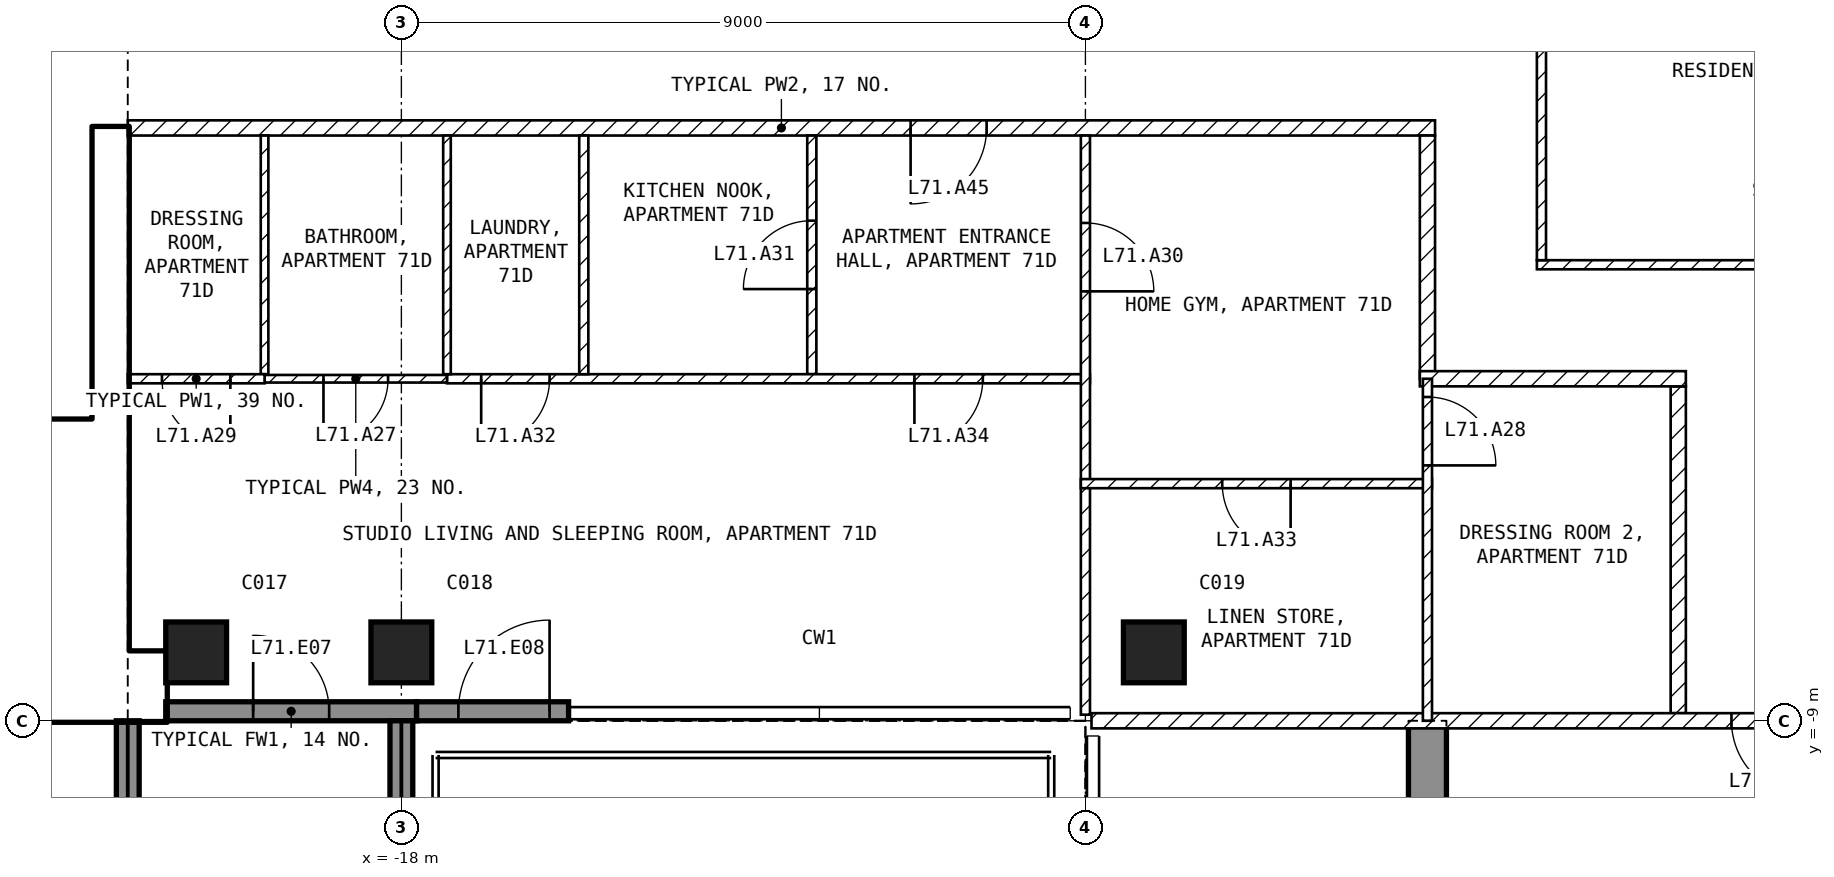
"""IFC4 building model, lengths in metres.
Left out: names, types, materials, properties, quantities, classifications, styles, units other than length and angle.
Written with IfcOpenShell. Run it as: python <this file> out.ifc"""

import sys

from ifc_helpers import new_model, si_unit, direction, frame, frame_2d, origin, origin_2d, place, context, subcontext, project, spatial, polyline, rectangle, outline, extrude, element, fill, save


model = new_model("IFC4")
c1 = context("Model", 3, precision=1e-05, world=origin(), true_north=direction((0.0, 1.0)))
c2 = subcontext(c1, "Body", "Model", "MODEL_VIEW")
j1 = project(units=[si_unit("LENGTHUNIT", "METRE"), si_unit("PLANEANGLEUNIT", "RADIAN")], contexts=[c1])
p1 = place(None, origin())
s1 = spatial("IfcSite", under=j1, at=p1, CompositionType="ELEMENT")
p2 = place(p1, origin())
s2 = spatial("IfcBuilding", under=s1, at=p2, CompositionType="ELEMENT")
p3 = place(p2, frame((0.0, 0.0, 278.0)))
s3 = spatial("IfcBuildingStorey", under=s2, at=p3, CompositionType="ELEMENT", Elevation=278.0)
for number, where, z_axis, x_axis in (
    (1, (-20.7, -8.1, -0.25), (0.0, 0.0, 1.0), (1.0, 0.0, 0.0)),
    (2, (-18.0, -8.1, -0.25), (0.0, 0.0, 1.0), (1.0, 0.0, 0.0)),
    (3, (-8.1, -8.1, -0.25), (0.0, 0.0, 1.0), (1.0, 0.0, 0.0)),
):
    element("IfcColumn", number, at=place(p3, frame(where, z_axis=z_axis, x_axis=x_axis)), inside=s3, PredefinedType="COLUMN", context=c2, shape_type="SweptSolid", body=[
        extrude(rectangle(XDim=0.8, YDim=0.8, at=origin_2d()), origin(), (0.0, 0.0, 1.0), 3.5),
    ])
p4 = place(p3, frame((-4.75, -16.7, -0.25), z_axis=(1.0, 0.0, 0.0), x_axis=(0.0, 1.0, 0.0)))
e4 = element("IfcWall", 4, at=p4, inside=s3, PredefinedType="SHEAR", context=c2, shape_type="SweptSolid", body=[
    extrude(outline(polyline([(0.0, 0.0), (3.2, 0.0), (3.2, 2.65), (5.6, 2.65), (5.6, 0.0), (7.7, 0.0), (7.7, 3.5), (0.0, 3.5), (0.0, 0.0)])), origin(), (0.0, 0.0, 1.0), 0.5),
])
p5 = place(p3, frame((-21.1, -8.875, 0.0), z_axis=(0.0, 0.0, 1.0), x_axis=(1.0, 0.0, 0.0)))
e5 = element("IfcWall", 5, at=p5, inside=s3, PredefinedType="SOLIDWALL", context=c2, shape_type="SweptSolid", body=[
    extrude(rectangle(XDim=3.3, YDim=0.25, at=frame_2d((1.65, 0.0))), origin(), (0.0, 0.0, 1.0), 3.25),
])
p6 = place(p5, frame((1.15, 0.0, 0.0)))
e6 = element("IfcOpeningElement", 6, at=p6, cuts=e5, PredefinedType="OPENING", context=c2, shape_type="SweptSolid", body=[
    extrude(rectangle(XDim=1.0, YDim=2.4, at=frame_2d((0.5, 1.2))), frame((0.0, 0.135, 0.0), z_axis=(0.0, -1.0, 0.0), x_axis=(1.0, 0.0, 0.0)), (0.0, 0.0, 1.0), 0.27),
])
p7 = place(p3, frame((-17.8, -8.875, 0.0), z_axis=(0.0, 0.0, 1.0), x_axis=(1.0, 0.0, 0.0)))
e7 = element("IfcWall", 7, at=p7, inside=s3, PredefinedType="SOLIDWALL", context=c2, shape_type="SweptSolid", body=[
    extrude(rectangle(XDim=2.0, YDim=0.25, at=frame_2d((1.0, 0.0))), origin(), (0.0, 0.0, 1.0), 3.25),
])
p8 = place(p7, frame((0.55, 0.0, 0.0)))
e8 = element("IfcOpeningElement", 8, at=p8, cuts=e7, PredefinedType="OPENING", context=c2, shape_type="SweptSolid", body=[
    extrude(rectangle(XDim=1.2, YDim=2.4, at=frame_2d((0.6, 1.2))), frame((0.0, 0.135, 0.0), z_axis=(0.0, -1.0, 0.0), x_axis=(1.0, 0.0, 0.0)), (0.0, 0.0, 1.0), 0.27),
])
p9 = place(p3, frame((-21.6, -9.0, 0.0), z_axis=(0.0, 0.0, 1.0), x_axis=(0.0, -1.0, 0.0)))
e9 = element("IfcWall", 9, at=p9, inside=s3, PredefinedType="SOLIDWALL", context=c2, shape_type="SweptSolid", body=[
    extrude(rectangle(XDim=2.7, YDim=0.3, at=frame_2d((1.35, 0.0))), origin(), (0.0, 0.0, 1.0), 3.25),
])
p10 = place(p3, frame((-18.0, -9.0, 0.0), z_axis=(0.0, 0.0, 1.0), x_axis=(0.0, -1.0, 0.0)))
e10 = element("IfcWall", 10, at=p10, inside=s3, PredefinedType="SOLIDWALL", context=c2, shape_type="SweptSolid", body=[
    extrude(rectangle(XDim=2.74, YDim=0.3, at=frame_2d((1.37, 0.0))), origin(), (0.0, 0.0, 1.0), 3.25),
])
p11 = place(p3, frame((-30.2, -8.55, 0.0), z_axis=(0.0, 0.0, 1.0), x_axis=(1.0, 0.0, 0.0)))
e11 = element("IfcWall", 11, at=p11, inside=s3, PredefinedType="SHEAR", context=c2, shape_type="SweptSolid", body=[
    extrude(rectangle(XDim=9.1, YDim=0.9, at=frame_2d((4.55, 0.0))), origin(), (0.0, 0.0, 1.0), 3.25),
])
p12 = place(p3, frame((-21.825, -8.1, 0.0), z_axis=(0.0, 0.0, 1.0), x_axis=(0.0, 1.0, 0.0)))
e12 = element("IfcWall", 12, at=p12, inside=s3, PredefinedType="SHEAR", context=c2, shape_type="SweptSolid", body=[
    extrude(rectangle(XDim=6.9, YDim=0.45, at=frame_2d((3.45, 0.0))), origin(), (0.0, 0.0, 1.0), 3.25),
])
p13 = place(p3, frame((-28.35, -5.15, 0.0), z_axis=(0.0, 0.0, 1.0), x_axis=(1.0, 0.0, 0.0)))
e13 = element("IfcWall", 13, at=p13, inside=s3, PredefinedType="SOLIDWALL", context=c2, shape_type="SweptSolid", body=[
    extrude(rectangle(XDim=6.3, YDim=0.2, at=frame_2d((3.15, 0.0))), origin(), (0.0, 0.0, 1.0), 3.25),
])
p14 = place(p13, frame((5.1, 0.0, 0.0)))
e14 = element("IfcOpeningElement", 14, at=p14, cuts=e13, PredefinedType="OPENING", context=c2, shape_type="SweptSolid", body=[
    extrude(rectangle(XDim=1.0, YDim=2.1, at=frame_2d((0.5, 1.05))), frame((0.0, 0.11, 0.0), z_axis=(0.0, -1.0, 0.0), x_axis=(1.0, 0.0, 0.0)), (0.0, 0.0, 1.0), 0.22),
])
p15 = place(p3, frame((-3.06, -3.0, 0.0), z_axis=(0.0, 0.0, 1.0), x_axis=(1.0, 0.0, 0.0)))
e15 = element("IfcWall", 15, at=p15, inside=s3, PredefinedType="PARTITIONING", context=c2, shape_type="SweptSolid", body=[
    extrude(rectangle(XDim=6.12, YDim=0.12, at=frame_2d((3.06, 0.0))), origin(), (0.0, 0.0, 1.0), 3.25),
])
p16 = place(p3, frame((-3.0, 2.94, 0.0), z_axis=(0.0, 0.0, 1.0), x_axis=(0.0, -1.0, 0.0)))
e16 = element("IfcWall", 16, at=p16, inside=s3, PredefinedType="PARTITIONING", context=c2, shape_type="SweptSolid", body=[
    extrude(rectangle(XDim=5.88, YDim=0.12, at=frame_2d((2.94, 0.0))), origin(), (0.0, 0.0, 1.0), 3.25),
])
p17 = place(p3, frame((-4.4, -1.2, 0.0), z_axis=(0.0, 0.0, 1.0), x_axis=(-1.0, 0.0, 0.0)))
e17 = element("IfcWall", 17, at=p17, inside=s3, PredefinedType="PARTITIONING", context=c2, shape_type="SweptSolid", body=[
    extrude(rectangle(XDim=17.2, YDim=0.2, at=frame_2d((8.6, 0.0))), origin(), (0.0, 0.0, 1.0), 3.25),
])
p18 = place(p17, frame((5.9, 0.0, 0.0)))
e18 = element("IfcOpeningElement", 18, at=p18, cuts=e17, PredefinedType="OPENING", context=c2, shape_type="SweptSolid", body=[
    extrude(rectangle(XDim=1.0, YDim=2.1, at=frame_2d((0.5, 1.05))), frame((0.0, 0.11, 0.0), z_axis=(0.0, -1.0, 0.0), x_axis=(1.0, 0.0, 0.0)), (0.0, 0.0, 1.0), 0.22),
])
p19 = place(p3, frame((-4.5, -4.5, 0.0), z_axis=(0.0, 0.0, 1.0), x_axis=(0.0, 1.0, 0.0)))
e19 = element("IfcWall", 19, at=p19, inside=s3, PredefinedType="PARTITIONING", context=c2, shape_type="SweptSolid", body=[
    extrude(rectangle(XDim=3.2, YDim=0.2, at=frame_2d((1.6, 0.0))), origin(), (0.0, 0.0, 1.0), 3.25),
])
p20 = place(p3, frame((-1.2, -8.9, 0.0), z_axis=(0.0, 0.0, 1.0), x_axis=(0.0, 1.0, 0.0)))
e20 = element("IfcWall", 20, at=p20, inside=s3, PredefinedType="PARTITIONING", context=c2, shape_type="SweptSolid", body=[
    extrude(rectangle(XDim=4.3, YDim=0.2, at=frame_2d((2.15, 0.0))), origin(), (0.0, 0.0, 1.0), 3.25),
])
p21 = place(p3, frame((-1.1, -4.5, 0.0), z_axis=(0.0, 0.0, 1.0), x_axis=(-1.0, 0.0, 0.0)))
e21 = element("IfcWall", 21, at=p21, inside=s3, PredefinedType="PARTITIONING", context=c2, shape_type="SweptSolid", body=[
    extrude(rectangle(XDim=3.5, YDim=0.2, at=frame_2d((1.75, 0.0))), origin(), (0.0, 0.0, 1.0), 3.25),
])
p22 = place(p3, frame((8.92, -9.0, 0.0), z_axis=(0.0, 0.0, 1.0), x_axis=(-1.0, 0.0, 0.0)))
e22 = element("IfcWall", 22, at=p22, inside=s3, PredefinedType="PARTITIONING", context=c2, shape_type="SweptSolid", body=[
    extrude(rectangle(XDim=17.84, YDim=0.2, at=frame_2d((8.92, 0.0))), origin(), (0.0, 0.0, 1.0), 3.25),
])
p23 = place(p22, frame((8.42, 0.0, 0.0)))
e23 = element("IfcOpeningElement", 23, at=p23, cuts=e22, PredefinedType="OPENING", context=c2, shape_type="SweptSolid", body=[
    extrude(rectangle(XDim=1.0, YDim=2.1, at=frame_2d((0.5, 1.05))), frame((0.0, 0.11, 0.0), z_axis=(0.0, -1.0, 0.0), x_axis=(1.0, 0.0, 0.0)), (0.0, 0.0, 1.0), 0.22),
])
p24 = place(p3, frame((-12.6, -4.44, 0.0), z_axis=(0.0, 0.0, 1.0), x_axis=(0.0, 1.0, 0.0)))
e24 = element("IfcWall", 24, at=p24, inside=s3, PredefinedType="PARTITIONING", context=c2, shape_type="SweptSolid", body=[
    extrude(rectangle(XDim=3.14, YDim=0.12, at=frame_2d((1.57, 0.0))), origin(), (0.0, 0.0, 1.0), 3.25),
])
p25 = place(p24, frame((1.12, 0.0, 0.0)))
e25 = element("IfcOpeningElement", 25, at=p25, cuts=e24, PredefinedType="OPENING", context=c2, shape_type="SweptSolid", body=[
    extrude(rectangle(XDim=0.9, YDim=2.1, at=frame_2d((0.45, 1.05))), frame((0.0, 0.07, 0.0), z_axis=(0.0, -1.0, 0.0), x_axis=(1.0, 0.0, 0.0)), (0.0, 0.0, 1.0), 0.14),
])
p26 = place(p3, frame((-8.94, -4.5, 0.0), z_axis=(0.0, 0.0, 1.0), x_axis=(-1.0, 0.0, 0.0)))
e26 = element("IfcWall", 26, at=p26, inside=s3, PredefinedType="PARTITIONING", context=c2, shape_type="SweptSolid", body=[
    extrude(rectangle(XDim=8.46, YDim=0.12, at=frame_2d((4.23, 0.0))), origin(), (0.0, 0.0, 1.0), 3.25),
])
p27 = place(p26, frame((7.11, 0.0, 0.0)))
e27 = element("IfcOpeningElement", 27, at=p27, cuts=e26, PredefinedType="OPENING", context=c2, shape_type="SweptSolid", body=[
    extrude(rectangle(XDim=0.9, YDim=2.1, at=frame_2d((0.45, 1.05))), frame((0.0, 0.07, 0.0), z_axis=(0.0, -1.0, 0.0), x_axis=(1.0, 0.0, 0.0)), (0.0, 0.0, 1.0), 0.14),
])
p28 = place(p26, frame((1.41, 0.0, 0.0)))
e28 = element("IfcOpeningElement", 28, at=p28, cuts=e26, PredefinedType="OPENING", context=c2, shape_type="SweptSolid", body=[
    extrude(rectangle(XDim=0.9, YDim=2.1, at=frame_2d((0.45, 1.05))), frame((0.0, 0.07, 0.0), z_axis=(0.0, -1.0, 0.0), x_axis=(1.0, 0.0, 0.0)), (0.0, 0.0, 1.0), 0.14),
])
p29 = place(p3, frame((-9.0, -1.3, 0.0), z_axis=(0.0, 0.0, 1.0), x_axis=(0.0, -1.0, 0.0)))
e29 = element("IfcWall", 29, at=p29, inside=s3, PredefinedType="PARTITIONING", context=c2, shape_type="SweptSolid", body=[
    extrude(rectangle(XDim=7.62, YDim=0.12, at=frame_2d((3.81, 0.0))), origin(), (0.0, 0.0, 1.0), 3.25),
])
p30 = place(p29, frame((1.15, 0.0, 0.0)))
e30 = element("IfcOpeningElement", 30, at=p30, cuts=e29, PredefinedType="OPENING", context=c2, shape_type="SweptSolid", body=[
    extrude(rectangle(XDim=0.9, YDim=2.1, at=frame_2d((0.45, 1.05))), frame((0.0, 0.07, 0.0), z_axis=(0.0, -1.0, 0.0), x_axis=(1.0, 0.0, 0.0)), (0.0, 0.0, 1.0), 0.14),
])
p31 = place(p3, frame((-15.6, -4.44, 0.0), z_axis=(0.0, 0.0, 1.0), x_axis=(0.0, 1.0, 0.0)))
e31 = element("IfcWall", 31, at=p31, inside=s3, PredefinedType="PARTITIONING", context=c2, shape_type="SweptSolid", body=[
    extrude(rectangle(XDim=3.14, YDim=0.12, at=frame_2d((1.57, 0.0))), origin(), (0.0, 0.0, 1.0), 3.25),
])
for number, where, z_axis, x_axis in (
    (32, (-17.4, -4.44, 0.0), (0.0, 0.0, 1.0), (0.0, 1.0, 0.0)),
    (33, (-19.8, -4.44, 0.0), (0.0, 0.0, 1.0), (0.0, 1.0, 0.0)),
):
    element("IfcWall", number, at=place(p3, frame(where, z_axis=z_axis, x_axis=x_axis)), inside=s3, PredefinedType="PARTITIONING", context=c2, shape_type="SweptSolid", body=[
        extrude(rectangle(XDim=3.14, YDim=0.1, at=frame_2d((1.57, 0.0))), origin(), (0.0, 0.0, 1.0), 3.25),
    ])
p32 = place(p3, frame((-17.4, -4.5, 0.0), z_axis=(0.0, 0.0, 1.0), x_axis=(-1.0, 0.0, 0.0)))
e34 = element("IfcWall", 34, at=p32, inside=s3, PredefinedType="PARTITIONING", context=c2, shape_type="SweptSolid", body=[
    extrude(rectangle(XDim=2.4, YDim=0.1, at=frame_2d((1.2, 0.0))), origin(), (0.0, 0.0, 1.0), 3.25),
])
p33 = place(p32, frame((0.775, 0.0, 0.0)))
e35 = element("IfcOpeningElement", 35, at=p33, cuts=e34, PredefinedType="OPENING", context=c2, shape_type="SweptSolid", body=[
    extrude(rectangle(XDim=0.85, YDim=2.1, at=frame_2d((0.425, 1.05))), frame((0.0, 0.06, 0.0), z_axis=(0.0, -1.0, 0.0), x_axis=(1.0, 0.0, 0.0)), (0.0, 0.0, 1.0), 0.12),
])
p34 = place(p3, frame((-19.8, -4.5, 0.0), z_axis=(0.0, 0.0, 1.0), x_axis=(-1.0, 0.0, 0.0)))
e36 = element("IfcWall", 36, at=p34, inside=s3, PredefinedType="PARTITIONING", context=c2, shape_type="SweptSolid", body=[
    extrude(rectangle(XDim=1.8, YDim=0.12, at=frame_2d((0.9, 0.0))), origin(), (0.0, 0.0, 1.0), 3.25),
])
p35 = place(p34, frame((0.45, 0.0, 0.0)))
e37 = element("IfcOpeningElement", 37, at=p35, cuts=e36, PredefinedType="OPENING", context=c2, shape_type="SweptSolid", body=[
    extrude(rectangle(XDim=0.9, YDim=2.1, at=frame_2d((0.45, 1.05))), frame((0.0, 0.07, 0.0), z_axis=(0.0, -1.0, 0.0), x_axis=(1.0, 0.0, 0.0)), (0.0, 0.0, 1.0), 0.14),
])
p36 = place(p3, frame((-4.44, -5.88, 0.0), z_axis=(0.0, 0.0, 1.0), x_axis=(-1.0, 0.0, 0.0)))
e38 = element("IfcWall", 38, at=p36, inside=s3, PredefinedType="PARTITIONING", context=c2, shape_type="SweptSolid", body=[
    extrude(rectangle(XDim=4.62, YDim=0.12, at=frame_2d((2.31, 0.0))), origin(), (0.0, 0.0, 1.0), 3.25),
])
p37 = place(p36, frame((1.86, 0.0, 0.0)))
e39 = element("IfcOpeningElement", 39, at=p37, cuts=e38, PredefinedType="OPENING", context=c2, shape_type="SweptSolid", body=[
    extrude(rectangle(XDim=0.9, YDim=2.1, at=frame_2d((0.45, 1.05))), frame((0.0, 0.07, 0.0), z_axis=(0.0, -1.0, 0.0), x_axis=(1.0, 0.0, 0.0)), (0.0, 0.0, 1.0), 0.14),
])
p38 = place(p3, frame((-4.5, -4.5, 0.0), z_axis=(0.0, 0.0, 1.0), x_axis=(0.0, -1.0, 0.0)))
e40 = element("IfcWall", 40, at=p38, inside=s3, PredefinedType="PARTITIONING", context=c2, shape_type="SweptSolid", body=[
    extrude(rectangle(XDim=4.5, YDim=0.12, at=frame_2d((2.25, 0.0))), origin(), (0.0, 0.0, 1.0), 3.25),
])
p39 = place(p38, frame((0.24, 0.0, 0.0)))
e41 = element("IfcOpeningElement", 41, at=p39, cuts=e40, PredefinedType="OPENING", context=c2, shape_type="SweptSolid", body=[
    extrude(rectangle(XDim=0.9, YDim=2.1, at=frame_2d((0.45, 1.05))), frame((0.0, 0.07, 0.0), z_axis=(0.0, -1.0, 0.0), x_axis=(1.0, 0.0, 0.0)), (0.0, 0.0, 1.0), 0.14),
])
p40 = place(p6, origin())
e42 = element("IfcDoor", 42, at=p40, inside=s3, OperationType="SINGLE_SWING_LEFT", PredefinedType="DOOR", context=c2, shape_type="SweptSolid", body=[
    extrude(rectangle(XDim=1.0, YDim=2.4, at=frame_2d((0.5, 1.2))), frame((0.0, 0.025, 0.0), z_axis=(0.0, -1.0, 0.0), x_axis=(1.0, 0.0, 0.0)), (0.0, 0.0, 1.0), 0.05),
])
fill(e6, e42)
p41 = place(p8, origin())
e43 = element("IfcDoor", 43, at=p41, inside=s3, OperationType="SINGLE_SWING_RIGHT", PredefinedType="DOOR", context=c2, shape_type="SweptSolid", body=[
    extrude(rectangle(XDim=1.2, YDim=2.4, at=frame_2d((0.6, 1.2))), frame((0.0, 0.025, 0.0), z_axis=(0.0, -1.0, 0.0), x_axis=(1.0, 0.0, 0.0)), (0.0, 0.0, 1.0), 0.05),
])
fill(e8, e43)
p42 = place(p14, origin())
e44 = element("IfcDoor", 44, at=p42, inside=s3, OperationType="SINGLE_SWING_LEFT", PredefinedType="DOOR", context=c2, shape_type="SweptSolid", body=[
    extrude(rectangle(XDim=1.0, YDim=2.1, at=frame_2d((0.5, 1.05))), frame((0.0, 0.025, 0.0), z_axis=(0.0, -1.0, 0.0), x_axis=(1.0, 0.0, 0.0)), (0.0, 0.0, 1.0), 0.05),
])
fill(e14, e44)
p43 = place(p33, origin())
e45 = element("IfcDoor", 45, at=p43, inside=s3, OperationType="SINGLE_SWING_RIGHT", PredefinedType="DOOR", context=c2, shape_type="SweptSolid", body=[
    extrude(rectangle(XDim=0.85, YDim=2.1, at=frame_2d((0.425, 1.05))), frame((0.0, 0.025, 0.0), z_axis=(0.0, -1.0, 0.0), x_axis=(1.0, 0.0, 0.0)), (0.0, 0.0, 1.0), 0.05),
])
fill(e35, e45)
p44 = place(p39, origin())
e46 = element("IfcDoor", 46, at=p44, inside=s3, OperationType="SINGLE_SWING_RIGHT", PredefinedType="DOOR", context=c2, shape_type="SweptSolid", body=[
    extrude(rectangle(XDim=0.9, YDim=2.1, at=frame_2d((0.45, 1.05))), frame((0.0, 0.025, 0.0), z_axis=(0.0, -1.0, 0.0), x_axis=(1.0, 0.0, 0.0)), (0.0, 0.0, 1.0), 0.05),
])
fill(e41, e46)
p45 = place(p35, origin())
e47 = element("IfcDoor", 47, at=p45, inside=s3, OperationType="SINGLE_SWING_LEFT", PredefinedType="DOOR", context=c2, shape_type="SweptSolid", body=[
    extrude(rectangle(XDim=0.9, YDim=2.1, at=frame_2d((0.45, 1.05))), frame((0.0, 0.025, 0.0), z_axis=(0.0, -1.0, 0.0), x_axis=(1.0, 0.0, 0.0)), (0.0, 0.0, 1.0), 0.05),
])
fill(e37, e47)
p46 = place(p30, origin())
e48 = element("IfcDoor", 48, at=p46, inside=s3, OperationType="SINGLE_SWING_RIGHT", PredefinedType="DOOR", context=c2, shape_type="SweptSolid", body=[
    extrude(rectangle(XDim=0.9, YDim=2.1, at=frame_2d((0.45, 1.05))), frame((0.0, 0.025, 0.0), z_axis=(0.0, -1.0, 0.0), x_axis=(1.0, 0.0, 0.0)), (0.0, 0.0, 1.0), 0.05),
])
fill(e30, e48)
p47 = place(p25, origin())
e49 = element("IfcDoor", 49, at=p47, inside=s3, OperationType="SINGLE_SWING_LEFT", PredefinedType="DOOR", context=c2, shape_type="SweptSolid", body=[
    extrude(rectangle(XDim=0.9, YDim=2.1, at=frame_2d((0.45, 1.05))), frame((0.0, 0.025, 0.0), z_axis=(0.0, -1.0, 0.0), x_axis=(1.0, 0.0, 0.0)), (0.0, 0.0, 1.0), 0.05),
])
fill(e25, e49)
p48 = place(p27, origin())
e50 = element("IfcDoor", 50, at=p48, inside=s3, OperationType="SINGLE_SWING_RIGHT", PredefinedType="DOOR", context=c2, shape_type="SweptSolid", body=[
    extrude(rectangle(XDim=0.9, YDim=2.1, at=frame_2d((0.45, 1.05))), frame((0.0, 0.025, 0.0), z_axis=(0.0, -1.0, 0.0), x_axis=(1.0, 0.0, 0.0)), (0.0, 0.0, 1.0), 0.05),
])
fill(e27, e50)
p49 = place(p37, origin())
e51 = element("IfcDoor", 51, at=p49, inside=s3, OperationType="SINGLE_SWING_LEFT", PredefinedType="DOOR", context=c2, shape_type="SweptSolid", body=[
    extrude(rectangle(XDim=0.9, YDim=2.1, at=frame_2d((0.45, 1.05))), frame((0.0, 0.025, 0.0), z_axis=(0.0, -1.0, 0.0), x_axis=(1.0, 0.0, 0.0)), (0.0, 0.0, 1.0), 0.05),
])
fill(e39, e51)
p50 = place(p28, origin())
e52 = element("IfcDoor", 52, at=p50, inside=s3, OperationType="SINGLE_SWING_RIGHT", PredefinedType="DOOR", context=c2, shape_type="SweptSolid", body=[
    extrude(rectangle(XDim=0.9, YDim=2.1, at=frame_2d((0.45, 1.05))), frame((0.0, 0.025, 0.0), z_axis=(0.0, -1.0, 0.0), x_axis=(1.0, 0.0, 0.0)), (0.0, 0.0, 1.0), 0.05),
])
fill(e28, e52)
p51 = place(p23, origin())
e53 = element("IfcDoor", 53, at=p51, inside=s3, OperationType="SINGLE_SWING_LEFT", PredefinedType="DOOR", context=c2, shape_type="SweptSolid", body=[
    extrude(rectangle(XDim=1.0, YDim=2.1, at=frame_2d((0.5, 1.05))), frame((0.0, 0.025, 0.0), z_axis=(0.0, -1.0, 0.0), x_axis=(1.0, 0.0, 0.0)), (0.0, 0.0, 1.0), 0.05),
])
fill(e23, e53)
p52 = place(p18, origin())
e54 = element("IfcDoor", 54, at=p52, inside=s3, OperationType="SINGLE_SWING_RIGHT", PredefinedType="DOOR", context=c2, shape_type="SweptSolid", body=[
    extrude(rectangle(XDim=1.0, YDim=2.1, at=frame_2d((0.5, 1.05))), frame((0.0, 0.025, 0.0), z_axis=(0.0, -1.0, 0.0), x_axis=(1.0, 0.0, 0.0)), (0.0, 0.0, 1.0), 0.05),
])
fill(e18, e54)
save(model, sys.argv[1])
